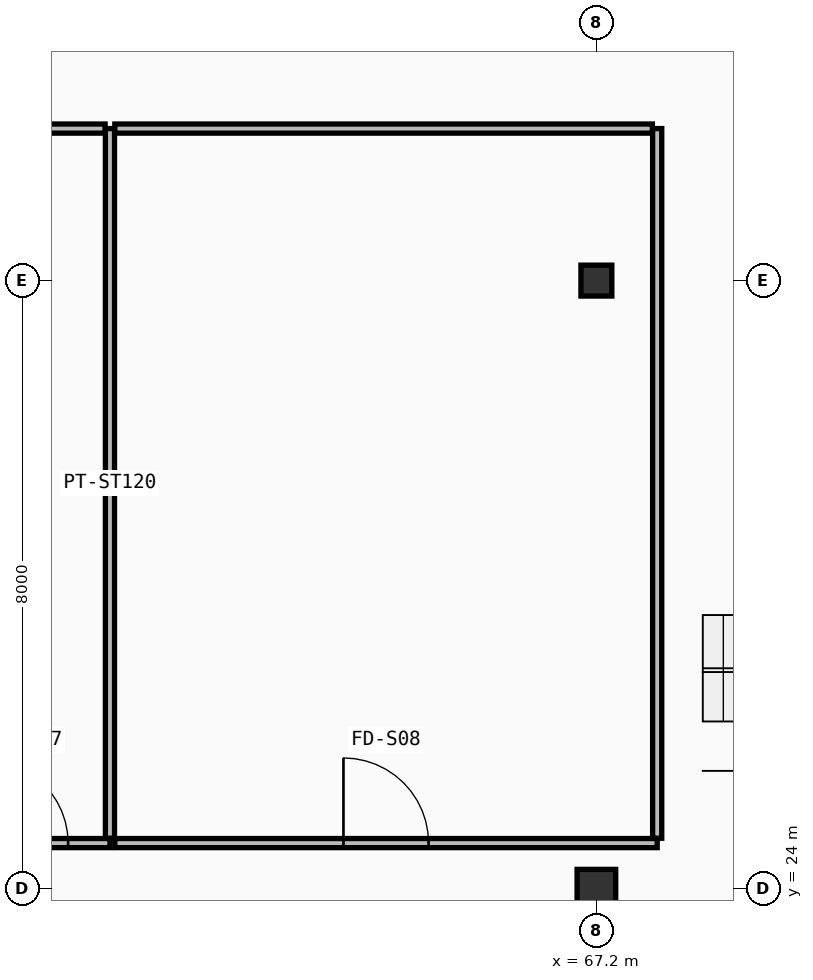
"""IFC4 building model, lengths in metres.
Left out: names, types, materials, properties, quantities, classifications, styles, units other than length and angle.
Written with IfcOpenShell. Run it as: python <this file> out.ifc"""

import sys

from ifc_helpers import new_model, si_unit, direction, frame, frame_2d, origin, origin_2d, place, context, subcontext, project, spatial, rectangle, hollow_circle, extrude, element, fill, save


model = new_model("IFC4")
c1 = context("Model", 3, precision=1e-05, world=origin(), true_north=direction((0.0, 1.0)))
c2 = subcontext(c1, "Body", "Model", "MODEL_VIEW")
j1 = project(units=[si_unit("LENGTHUNIT", "METRE"), si_unit("PLANEANGLEUNIT", "RADIAN")], contexts=[c1])
p1 = place(None, origin())
s1 = spatial("IfcSite", under=j1, at=p1, CompositionType="ELEMENT")
p2 = place(p1, origin())
s2 = spatial("IfcBuilding", under=s1, at=p2, CompositionType="ELEMENT")
p3 = place(p2, frame((0.0, 0.0, 20.4)))
s3 = spatial("IfcBuildingStorey", under=s2, at=p3, CompositionType="ELEMENT", Elevation=20.4)
p4 = place(p3, frame((67.2, 24.0, 0.0), z_axis=(0.0, 0.0, 1.0), x_axis=(1.0, 0.0, 0.0)))
e1 = element("IfcColumn", 1, at=p4, inside=s3, PredefinedType="COLUMN", context=c2, shape_type="SweptSolid", body=[
    extrude(hollow_circle(Radius=0.254, WallThickness=0.025, at=origin_2d()), origin(), (0.0, 0.0, 1.0), 4.5),
])
p5 = place(p3, frame((67.2, 32.0, 0.0), z_axis=(0.0, 0.0, 1.0), x_axis=(1.0, 0.0, 0.0)))
e2 = element("IfcColumn", 2, at=p5, inside=s3, PredefinedType="COLUMN", context=c2, shape_type="SweptSolid", body=[
    extrude(hollow_circle(Radius=0.203, WallThickness=0.02, at=origin_2d()), origin(), (0.0, 0.0, 1.0), 4.5),
])
p6 = place(p3, frame((54.546, 24.6, 0.0), z_axis=(0.0, 0.0, 1.0), x_axis=(1.0, 0.0, 0.0)))
e3 = element("IfcWall", 3, at=p6, inside=s3, PredefinedType="PARTITIONING", context=c2, shape_type="SweptSolid", body=[
    extrude(rectangle(XDim=6.254, YDim=0.12, at=frame_2d((3.127, 0.0))), origin(), (0.0, 0.0, 1.0), 3.72),
])
p7 = place(p6, frame((4.613, 0.0, 0.0)))
e4 = element("IfcOpeningElement", 4, at=p7, cuts=e3, PredefinedType="OPENING", context=c2, shape_type="SweptSolid", body=[
    extrude(rectangle(XDim=1.09, YDim=2.18, at=frame_2d((0.545, 1.09))), frame((0.0, 0.07, 0.0), z_axis=(0.0, -1.0, 0.0), x_axis=(1.0, 0.0, 0.0)), (0.0, 0.0, 1.0), 0.14),
])
p8 = place(p3, frame((60.8, 24.664, 0.0), z_axis=(0.0, 0.0, 1.0), x_axis=(0.0, 1.0, 0.0)))
e5 = element("IfcWall", 5, at=p8, inside=s3, PredefinedType="PARTITIONING", context=c2, shape_type="SweptSolid", body=[
    extrude(rectangle(XDim=9.336, YDim=0.12, at=frame_2d((4.668, 0.0))), origin(), (0.0, 0.0, 1.0), 3.72),
])
p9 = place(p3, frame((60.736, 34.0, 0.0), z_axis=(0.0, 0.0, 1.0), x_axis=(-1.0, 0.0, 0.0)))
e6 = element("IfcWall", 6, at=p9, inside=s3, PredefinedType="PARTITIONING", context=c2, shape_type="SweptSolid", body=[
    extrude(rectangle(XDim=6.19, YDim=0.12, at=frame_2d((3.095, 0.0))), origin(), (0.0, 0.0, 1.0), 3.62),
])
p10 = place(p3, frame((60.864, 24.6, 0.0), z_axis=(0.0, 0.0, 1.0), x_axis=(1.0, 0.0, 0.0)))
e7 = element("IfcWall", 7, at=p10, inside=s3, PredefinedType="PARTITIONING", context=c2, shape_type="SweptSolid", body=[
    extrude(rectangle(XDim=7.136, YDim=0.12, at=frame_2d((3.568, 0.0))), origin(), (0.0, 0.0, 1.0), 3.62),
])
p11 = place(p10, frame((3.008, 0.0, 0.0)))
e8 = element("IfcOpeningElement", 8, at=p11, cuts=e7, PredefinedType="OPENING", context=c2, shape_type="SweptSolid", body=[
    extrude(rectangle(XDim=1.12, YDim=2.2, at=frame_2d((0.56, 1.1))), frame((0.0, 0.07, 0.0), z_axis=(0.0, -1.0, 0.0), x_axis=(1.0, 0.0, 0.0)), (0.0, 0.0, 1.0), 0.14),
])
p12 = place(p3, frame((68.0, 24.664, 0.0), z_axis=(0.0, 0.0, 1.0), x_axis=(0.0, 1.0, 0.0)))
e9 = element("IfcWall", 9, at=p12, inside=s3, PredefinedType="PARTITIONING", context=c2, shape_type="SweptSolid", body=[
    extrude(rectangle(XDim=9.336, YDim=0.12, at=frame_2d((4.668, 0.0))), origin(), (0.0, 0.0, 1.0), 3.77),
])
p13 = place(p3, frame((67.936, 34.0, 0.0), z_axis=(0.0, 0.0, 1.0), x_axis=(-1.0, 0.0, 0.0)))
e10 = element("IfcWall", 10, at=p13, inside=s3, PredefinedType="PARTITIONING", context=c2, shape_type="SweptSolid", body=[
    extrude(rectangle(XDim=7.072, YDim=0.12, at=frame_2d((3.536, 0.0))), origin(), (0.0, 0.0, 1.0), 3.67),
])
p14 = place(p7, origin())
e11 = element("IfcDoor", 11, at=p14, inside=s3, OperationType="SINGLE_SWING_RIGHT", PredefinedType="DOOR", context=c2, shape_type="SweptSolid", body=[
    extrude(rectangle(XDim=1.09, YDim=2.18, at=frame_2d((0.545, 1.09))), frame((0.0, 0.025, 0.0), z_axis=(0.0, -1.0, 0.0), x_axis=(1.0, 0.0, 0.0)), (0.0, 0.0, 1.0), 0.05),
])
fill(e4, e11)
p15 = place(p11, origin())
e12 = element("IfcDoor", 12, at=p15, inside=s3, OperationType="SINGLE_SWING_LEFT", PredefinedType="DOOR", context=c2, shape_type="SweptSolid", body=[
    extrude(rectangle(XDim=1.12, YDim=2.2, at=frame_2d((0.56, 1.1))), frame((0.0, 0.025, 0.0), z_axis=(0.0, -1.0, 0.0), x_axis=(1.0, 0.0, 0.0)), (0.0, 0.0, 1.0), 0.05),
])
fill(e8, e12)
save(model, sys.argv[1])
